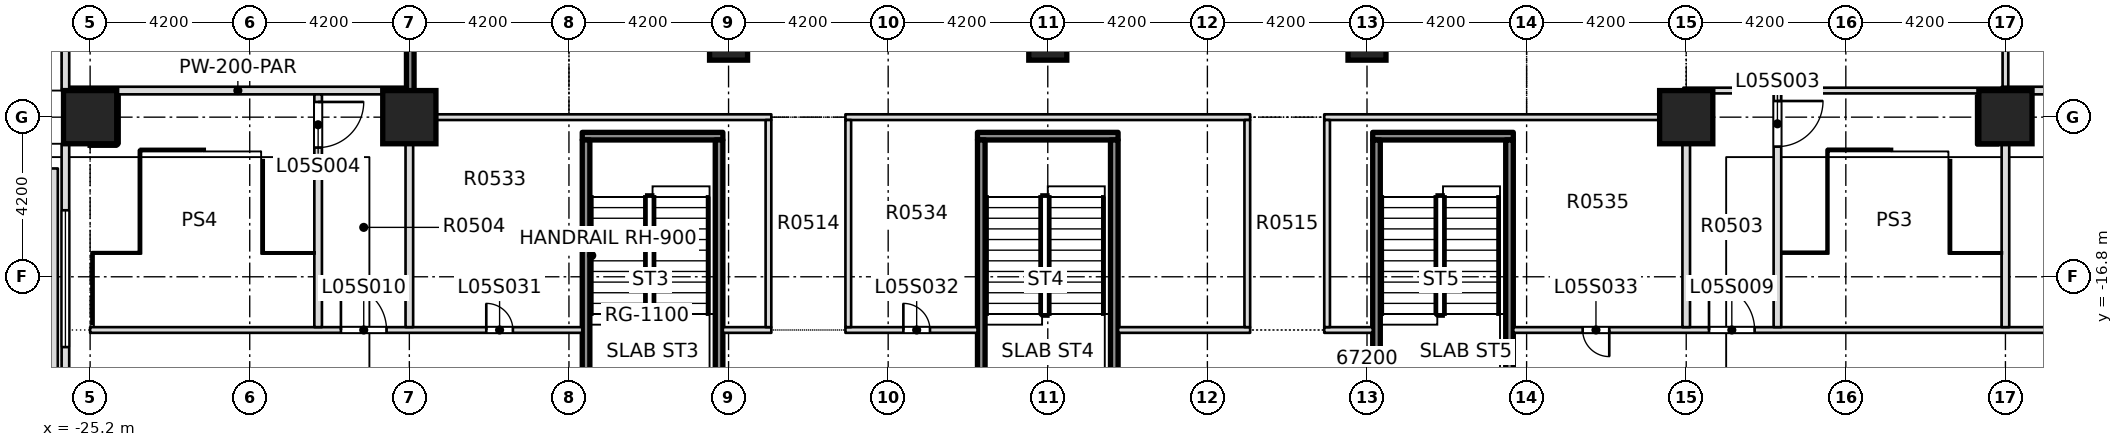
"""IFC4 building model, lengths in metres.
Left out: names, types, materials, properties, quantities, classifications, styles, units other than length and angle.
Written with IfcOpenShell. Run it as: python <this file> out.ifc"""

import sys

from ifc_helpers import new_model, si_unit, direction, frame, frame_2d, origin, origin_2d, place, context, subcontext, project, spatial, rectangle, extrude, element, fill, save


model = new_model("IFC4")
c1 = context("Model", 3, precision=1e-05, world=origin(), true_north=direction((0.0, 1.0)))
c2 = subcontext(c1, "Body", "Model", "MODEL_VIEW")
j1 = project(units=[si_unit("LENGTHUNIT", "METRE"), si_unit("PLANEANGLEUNIT", "RADIAN")], contexts=[c1])
p1 = place(None, origin())
s1 = spatial("IfcSite", under=j1, at=p1, CompositionType="ELEMENT")
p2 = place(p1, origin())
s2 = spatial("IfcBuilding", under=s1, at=p2, CompositionType="ELEMENT")
p3 = place(p2, frame((0.0, 0.0, 30.0)))
s3 = spatial("IfcBuildingStorey", under=s2, at=p3, CompositionType="ELEMENT", Elevation=30.0)
for number, where, z_axis, x_axis in (
    (1, (-25.2, -12.6, -0.4), (0.0, 0.0, 1.0), (1.0, 0.0, 0.0)),
    (2, (-16.8, -12.6, -0.4), (0.0, 0.0, 1.0), (1.0, 0.0, 0.0)),
    (3, (16.8, -12.6, -0.4), (0.0, 0.0, 1.0), (1.0, 0.0, 0.0)),
    (4, (25.2, -12.6, -0.4), (0.0, 0.0, 1.0), (1.0, 0.0, 0.0)),
):
    element("IfcColumn", number, at=place(p3, frame(where, z_axis=z_axis, x_axis=x_axis)), inside=s3, PredefinedType="COLUMN", context=c2, shape_type="SweptSolid", body=[
        extrude(rectangle(XDim=1.4, YDim=1.4, at=origin_2d()), origin(), (0.0, 0.0, 1.0), 4.58),
    ])
for number, where, z_axis, x_axis in (
    (5, (-8.4, -10.6, -0.4), (0.0, 0.0, 1.0), (1.0, 0.0, 0.0)),
    (6, (0.0, -10.6, -0.4), (0.0, 0.0, 1.0), (1.0, 0.0, 0.0)),
    (7, (8.4, -10.6, -0.4), (0.0, 0.0, 1.0), (1.0, 0.0, 0.0)),
):
    element("IfcColumn", number, at=place(p3, frame(where, z_axis=z_axis, x_axis=x_axis)), inside=s3, PredefinedType="COLUMN", context=c2, shape_type="SweptSolid", body=[
        extrude(rectangle(XDim=1.0, YDim=1.0, at=origin_2d()), origin(), (0.0, 0.0, 1.0), 4.58),
    ])
p4 = place(p3, frame((-26.15, -21.85, 4.5), z_axis=(0.0, 0.0, 1.0), x_axis=(0.0, 1.0, 0.0)))
e8 = element("IfcWall", 8, at=p4, inside=s3, PredefinedType="PARAPET", context=c2, shape_type="SweptSolid", body=[
    extrude(rectangle(XDim=7.9, YDim=0.2, at=frame_2d((3.95, 0.0))), origin(), (0.0, 0.0, 1.0), 1.2),
])
p5 = place(p3, frame((-25.2, -18.2, 0.0), z_axis=(0.0, 0.0, 1.0), x_axis=(1.0, 0.0, 0.0)))
e9 = element("IfcWall", 9, at=p5, inside=s3, PredefinedType="PARTITIONING", context=c2, shape_type="SweptSolid", body=[
    extrude(rectangle(XDim=12.95, YDim=0.15, at=frame_2d((6.475, 0.0))), origin(), (0.0, 0.0, 1.0), 4.18),
])
p6 = place(p5, frame((6.6, 0.0, 0.0)))
e10 = element("IfcOpeningElement", 10, at=p6, cuts=e9, PredefinedType="OPENING", context=c2, shape_type="SweptSolid", body=[
    extrude(rectangle(XDim=1.2, YDim=2.1, at=frame_2d((0.6, 1.05))), frame((0.0, 0.085, 0.0), z_axis=(0.0, -1.0, 0.0), x_axis=(1.0, 0.0, 0.0)), (0.0, 0.0, 1.0), 0.17),
])
p7 = place(p5, frame((10.425, 0.0, 0.0)))
e11 = element("IfcOpeningElement", 11, at=p7, cuts=e9, PredefinedType="OPENING", context=c2, shape_type="SweptSolid", body=[
    extrude(rectangle(XDim=0.7, YDim=2.1, at=frame_2d((0.35, 1.05))), frame((0.0, 0.085, 0.0), z_axis=(0.0, -1.0, 0.0), x_axis=(1.0, 0.0, 0.0)), (0.0, 0.0, 1.0), 0.17),
])
p8 = place(p3, frame((-8.55, -18.2, 0.0), z_axis=(0.0, 0.0, 1.0), x_axis=(1.0, 0.0, 0.0)))
e12 = element("IfcWall", 12, at=p8, inside=s3, PredefinedType="PARTITIONING", context=c2, shape_type="SweptSolid", body=[
    extrude(rectangle(XDim=1.275, YDim=0.15, at=frame_2d((0.638, 0.0))), origin(), (0.0, 0.0, 1.0), 4.18),
])
p9 = place(p3, frame((-5.325, -18.2, 0.0), z_axis=(0.0, 0.0, 1.0), x_axis=(1.0, 0.0, 0.0)))
e13 = element("IfcWall", 13, at=p9, inside=s3, PredefinedType="PARTITIONING", context=c2, shape_type="SweptSolid", body=[
    extrude(rectangle(XDim=3.475, YDim=0.15, at=frame_2d((1.737, 0.0))), origin(), (0.0, 0.0, 1.0), 4.18),
])
p10 = place(p9, frame((1.525, 0.0, 0.0)))
e14 = element("IfcOpeningElement", 14, at=p10, cuts=e13, PredefinedType="OPENING", context=c2, shape_type="SweptSolid", body=[
    extrude(rectangle(XDim=0.7, YDim=2.1, at=frame_2d((0.35, 1.05))), frame((0.0, 0.085, 0.0), z_axis=(0.0, -1.0, 0.0), x_axis=(1.0, 0.0, 0.0)), (0.0, 0.0, 1.0), 0.17),
])
p11 = place(p3, frame((1.85, -18.2, 0.0), z_axis=(0.0, 0.0, 1.0), x_axis=(1.0, 0.0, 0.0)))
e15 = element("IfcWall", 15, at=p11, inside=s3, PredefinedType="PARTITIONING", context=c2, shape_type="SweptSolid", body=[
    extrude(rectangle(XDim=3.475, YDim=0.15, at=frame_2d((1.737, 0.0))), origin(), (0.0, 0.0, 1.0), 4.18),
])
p12 = place(p3, frame((7.275, -18.2, 0.0), z_axis=(0.0, 0.0, 1.0), x_axis=(1.0, 0.0, 0.0)))
e16 = element("IfcWall", 16, at=p12, inside=s3, PredefinedType="PARTITIONING", context=c2, shape_type="SweptSolid", body=[
    extrude(rectangle(XDim=1.275, YDim=0.15, at=frame_2d((0.638, 0.0))), origin(), (0.0, 0.0, 1.0), 4.18),
])
p13 = place(p3, frame((12.25, -18.2, 0.0), z_axis=(0.0, 0.0, 1.0), x_axis=(1.0, 0.0, 0.0)))
e17 = element("IfcWall", 17, at=p13, inside=s3, PredefinedType="PARTITIONING", context=c2, shape_type="SweptSolid", body=[
    extrude(rectangle(XDim=24.0, YDim=0.15, at=frame_2d((12.0, 0.0))), origin(), (0.0, 0.0, 1.0), 4.18),
])
p14 = place(p13, frame((5.15, 0.0, 0.0)))
e18 = element("IfcOpeningElement", 18, at=p14, cuts=e17, PredefinedType="OPENING", context=c2, shape_type="SweptSolid", body=[
    extrude(rectangle(XDim=1.2, YDim=2.1, at=frame_2d((0.6, 1.05))), frame((0.0, 0.085, 0.0), z_axis=(0.0, -1.0, 0.0), x_axis=(1.0, 0.0, 0.0)), (0.0, 0.0, 1.0), 0.17),
])
p15 = place(p13, frame((17.975, 0.0, 0.0)))
e19 = element("IfcOpeningElement", 19, at=p15, cuts=e17, PredefinedType="OPENING", context=c2, shape_type="SweptSolid", body=[
    extrude(rectangle(XDim=0.9, YDim=2.1, at=frame_2d((0.45, 1.05))), frame((0.0, 0.085, 0.0), z_axis=(0.0, -1.0, 0.0), x_axis=(1.0, 0.0, 0.0)), (0.0, 0.0, 1.0), 0.17),
])
p16 = place(p13, frame((1.825, 0.0, 0.0)))
e20 = element("IfcOpeningElement", 20, at=p16, cuts=e17, PredefinedType="OPENING", context=c2, shape_type="SweptSolid", body=[
    extrude(rectangle(XDim=0.7, YDim=2.1, at=frame_2d((0.35, 1.05))), frame((0.0, 0.085, 0.0), z_axis=(0.0, -1.0, 0.0), x_axis=(1.0, 0.0, 0.0)), (0.0, 0.0, 1.0), 0.17),
])
p17 = place(p3, frame((-16.9, -12.6, 0.0), z_axis=(0.0, 0.0, 1.0), x_axis=(1.0, 0.0, 0.0)))
e21 = element("IfcWall", 21, at=p17, inside=s3, PredefinedType="PARTITIONING", context=c2, shape_type="SweptSolid", body=[
    extrude(rectangle(XDim=9.625, YDim=0.15, at=frame_2d((4.812, 0.0))), origin(), (0.0, 0.0, 1.0), 4.18),
])
p18 = place(p3, frame((-5.325, -12.6, 0.0), z_axis=(0.0, 0.0, 1.0), x_axis=(1.0, 0.0, 0.0)))
e22 = element("IfcWall", 22, at=p18, inside=s3, PredefinedType="PARTITIONING", context=c2, shape_type="SweptSolid", body=[
    extrude(rectangle(XDim=10.65, YDim=0.15, at=frame_2d((5.325, 0.0))), origin(), (0.0, 0.0, 1.0), 4.18),
])
p19 = place(p3, frame((7.275, -12.6, 0.0), z_axis=(0.0, 0.0, 1.0), x_axis=(1.0, 0.0, 0.0)))
e23 = element("IfcWall", 23, at=p19, inside=s3, PredefinedType="PARTITIONING", context=c2, shape_type="SweptSolid", body=[
    extrude(rectangle(XDim=9.625, YDim=0.15, at=frame_2d((4.812, 0.0))), origin(), (0.0, 0.0, 1.0), 4.18),
])
p20 = place(p3, frame((-25.75, -11.9, 0.0), z_axis=(0.0, 0.0, 1.0), x_axis=(1.0, 0.0, 0.0)))
e24 = element("IfcWall", 24, at=p20, inside=s3, PredefinedType="PARTITIONING", context=c2, shape_type="SweptSolid", body=[
    extrude(rectangle(XDim=8.875, YDim=0.2, at=frame_2d((4.438, 0.0))), origin(), (0.0, 0.0, 1.0), 4.18),
])
p21 = place(p3, frame((16.725, -11.9, 0.0), z_axis=(0.0, 0.0, 1.0), x_axis=(1.0, 0.0, 0.0)))
e25 = element("IfcWall", 25, at=p21, inside=s3, PredefinedType="PARTITIONING", context=c2, shape_type="SweptSolid", body=[
    extrude(rectangle(XDim=8.575, YDim=0.15, at=frame_2d((4.288, 0.0))), origin(), (0.0, 0.0, 1.0), 4.18),
])
p22 = place(p3, frame((25.1, -11.9, 0.0), z_axis=(0.0, 0.0, 1.0), x_axis=(1.0, 0.0, 0.0)))
e26 = element("IfcWall", 26, at=p22, inside=s3, PredefinedType="PARTITIONING", context=c2, shape_type="SweptSolid", body=[
    extrude(rectangle(XDim=17.45, YDim=0.2, at=frame_2d((8.725, 0.0))), origin(), (0.0, 0.0, 1.0), 4.18),
])
p23 = place(p22, frame((5.125, 0.0, 0.0)))
e27 = element("IfcOpeningElement", 27, at=p23, cuts=e26, PredefinedType="OPENING", context=c2, shape_type="SweptSolid", body=[
    extrude(rectangle(XDim=0.9, YDim=2.1, at=frame_2d((0.45, 1.05))), frame((0.0, 0.11, 0.0), z_axis=(0.0, -1.0, 0.0), x_axis=(1.0, 0.0, 0.0)), (0.0, 0.0, 1.0), 0.22),
])
p24 = place(p3, frame((-19.2, -18.125, 0.0), z_axis=(0.0, 0.0, 1.0), x_axis=(0.0, 1.0, 0.0)))
e28 = element("IfcWall", 28, at=p24, inside=s3, PredefinedType="PARTITIONING", context=c2, shape_type="SweptSolid", body=[
    extrude(rectangle(XDim=6.125, YDim=0.2, at=frame_2d((3.062, 0.0))), origin(), (0.0, 0.0, 1.0), 4.18),
])
p25 = place(p24, frame((4.725, 0.0, 0.0)))
e29 = element("IfcOpeningElement", 29, at=p25, cuts=e28, PredefinedType="OPENING", context=c2, shape_type="SweptSolid", body=[
    extrude(rectangle(XDim=1.2, YDim=2.1, at=frame_2d((0.6, 1.05))), frame((0.0, 0.11, 0.0), z_axis=(0.0, -1.0, 0.0), x_axis=(1.0, 0.0, 0.0)), (0.0, 0.0, 1.0), 0.22),
])
p26 = place(p3, frame((-16.8, -18.125, 0.0), z_axis=(0.0, 0.0, 1.0), x_axis=(0.0, 1.0, 0.0)))
e30 = element("IfcWall", 30, at=p26, inside=s3, PredefinedType="PARTITIONING", context=c2, shape_type="SweptSolid", body=[
    extrude(rectangle(XDim=5.45, YDim=0.2, at=frame_2d((2.725, 0.0))), origin(), (0.0, 0.0, 1.0), 4.18),
])
for number, where, z_axis, x_axis in (
    (31, (-7.35, -18.125, 0.0), (0.0, 0.0, 1.0), (0.0, 1.0, 0.0)),
    (32, (-5.25, -18.125, 0.0), (0.0, 0.0, 1.0), (0.0, 1.0, 0.0)),
    (33, (5.25, -18.125, 0.0), (0.0, 0.0, 1.0), (0.0, 1.0, 0.0)),
    (34, (7.35, -18.125, 0.0), (0.0, 0.0, 1.0), (0.0, 1.0, 0.0)),
):
    element("IfcWall", number, at=place(p3, frame(where, z_axis=z_axis, x_axis=x_axis)), inside=s3, PredefinedType="PARTITIONING", context=c2, shape_type="SweptSolid", body=[
        extrude(rectangle(XDim=5.45, YDim=0.15, at=frame_2d((2.725, 0.0))), origin(), (0.0, 0.0, 1.0), 4.18),
    ])
p27 = place(p3, frame((16.8, -18.125, 0.0), z_axis=(0.0, 0.0, 1.0), x_axis=(0.0, 1.0, 0.0)))
e35 = element("IfcWall", 35, at=p27, inside=s3, PredefinedType="PARTITIONING", context=c2, shape_type="SweptSolid", body=[
    extrude(rectangle(XDim=5.45, YDim=0.2, at=frame_2d((2.725, 0.0))), origin(), (0.0, 0.0, 1.0), 4.18),
])
p28 = place(p3, frame((16.8, -12.525, 0.0), z_axis=(0.0, 0.0, 1.0), x_axis=(0.0, 1.0, 0.0)))
e36 = element("IfcWall", 36, at=p28, inside=s3, PredefinedType="PARTITIONING", context=c2, shape_type="SweptSolid", body=[
    extrude(rectangle(XDim=0.55, YDim=0.15, at=frame_2d((0.275, 0.0))), origin(), (0.0, 0.0, 1.0), 4.18),
])
p29 = place(p3, frame((19.2, -18.125, 0.0), z_axis=(0.0, 0.0, 1.0), x_axis=(0.0, 1.0, 0.0)))
e37 = element("IfcWall", 37, at=p29, inside=s3, PredefinedType="PARTITIONING", context=c2, shape_type="SweptSolid", body=[
    extrude(rectangle(XDim=6.15, YDim=0.2, at=frame_2d((3.075, 0.0))), origin(), (0.0, 0.0, 1.0), 4.18),
])
p30 = place(p29, frame((4.75, 0.0, 0.0)))
e38 = element("IfcOpeningElement", 38, at=p30, cuts=e37, PredefinedType="OPENING", context=c2, shape_type="SweptSolid", body=[
    extrude(rectangle(XDim=1.2, YDim=2.1, at=frame_2d((0.6, 1.05))), frame((0.0, 0.11, 0.0), z_axis=(0.0, -1.0, 0.0), x_axis=(1.0, 0.0, 0.0)), (0.0, 0.0, 1.0), 0.22),
])
p31 = place(p3, frame((25.2, -18.125, 0.0), z_axis=(0.0, 0.0, 1.0), x_axis=(0.0, 1.0, 0.0)))
e39 = element("IfcWall", 39, at=p31, inside=s3, PredefinedType="PARTITIONING", context=c2, shape_type="SweptSolid", body=[
    extrude(rectangle(XDim=6.125, YDim=0.2, at=frame_2d((3.062, 0.0))), origin(), (0.0, 0.0, 1.0), 4.18),
])
p32 = place(p3, frame((25.2, -11.8, 0.0), z_axis=(0.0, 0.0, 1.0), x_axis=(0.0, 1.0, 0.0)))
e40 = element("IfcWall", 40, at=p32, inside=s3, PredefinedType="PARTITIONING", context=c2, shape_type="SweptSolid", body=[
    extrude(rectangle(XDim=24.3, YDim=0.15, at=frame_2d((12.15, 0.0))), origin(), (0.0, 0.0, 1.0), 4.18),
])
p33 = place(p32, frame((11.25, 0.0, 0.0)))
e41 = element("IfcOpeningElement", 41, at=p33, cuts=e40, PredefinedType="OPENING", context=c2, shape_type="SweptSolid", body=[
    extrude(rectangle(XDim=1.8, YDim=2.1, at=frame_2d((0.9, 1.05))), frame((0.0, 0.085, 0.0), z_axis=(0.0, -1.0, 0.0), x_axis=(1.0, 0.0, 0.0)), (0.0, 0.0, 1.0), 0.17),
])
p34 = place(p3, frame((-25.85, -4.9, 0.0), z_axis=(0.0, 0.0, 1.0), x_axis=(0.0, -1.0, 0.0)))
e42 = element("IfcWall", 42, at=p34, inside=s3, PredefinedType="STANDARD", context=c2, shape_type="SweptSolid", body=[
    extrude(rectangle(XDim=7.0, YDim=0.2, at=frame_2d((3.5, 0.0))), origin(), (0.0, 0.0, 1.0), 4.18),
])
p35 = place(p34, frame((1.7, 0.0, 0.9)))
e43 = element("IfcOpeningElement", 43, at=p35, cuts=e42, PredefinedType="OPENING", context=c2, shape_type="SweptSolid", body=[
    extrude(rectangle(XDim=3.6, YDim=2.4, at=frame_2d((1.8, 1.2))), frame((0.0, 0.11, 0.0), z_axis=(0.0, -1.0, 0.0), x_axis=(1.0, 0.0, 0.0)), (0.0, 0.0, 1.0), 0.22),
])
p36 = place(p3, frame((-25.85, -13.3, 0.0), z_axis=(0.0, 0.0, 1.0), x_axis=(0.0, -1.0, 0.0)))
e44 = element("IfcWall", 44, at=p36, inside=s3, PredefinedType="STANDARD", context=c2, shape_type="SweptSolid", body=[
    extrude(rectangle(XDim=7.1, YDim=0.2, at=frame_2d((3.55, 0.0))), origin(), (0.0, 0.0, 1.0), 4.18),
])
p37 = place(p36, frame((1.75, 0.0, 0.9)))
e45 = element("IfcOpeningElement", 45, at=p37, cuts=e44, PredefinedType="OPENING", context=c2, shape_type="SweptSolid", body=[
    extrude(rectangle(XDim=3.6, YDim=2.4, at=frame_2d((1.8, 1.2))), frame((0.0, 0.11, 0.0), z_axis=(0.0, -1.0, 0.0), x_axis=(1.0, 0.0, 0.0)), (0.0, 0.0, 1.0), 0.22),
])
p38 = place(p3, frame((-12.25, -13.1, 0.0), z_axis=(0.0, 0.0, 1.0), x_axis=(1.0, 0.0, 0.0)))
e46 = element("IfcWall", 46, at=p38, inside=s3, PredefinedType="SOLIDWALL", context=c2, shape_type="SweptSolid", body=[
    extrude(rectangle(XDim=3.7, YDim=0.2, at=frame_2d((1.85, 0.0))), origin(), (0.0, 0.0, 1.0), 4.18),
])
p39 = place(p3, frame((-12.15, -19.8, 0.0), z_axis=(0.0, 0.0, 1.0), x_axis=(0.0, 1.0, 0.0)))
e47 = element("IfcWall", 47, at=p39, inside=s3, PredefinedType="SOLIDWALL", context=c2, shape_type="SweptSolid", body=[
    extrude(rectangle(XDim=6.6, YDim=0.2, at=frame_2d((3.3, 0.0))), origin(), (0.0, 0.0, 1.0), 4.18),
])
p40 = place(p3, frame((-8.65, -20.3, 0.0), z_axis=(0.0, 0.0, 1.0), x_axis=(0.0, 1.0, 0.0)))
e48 = element("IfcWall", 48, at=p40, inside=s3, PredefinedType="SOLIDWALL", context=c2, shape_type="SweptSolid", body=[
    extrude(rectangle(XDim=7.1, YDim=0.2, at=frame_2d((3.55, 0.0))), origin(), (0.0, 0.0, 1.0), 4.18),
])
p41 = place(p3, frame((-1.85, -13.1, 0.0), z_axis=(0.0, 0.0, 1.0), x_axis=(1.0, 0.0, 0.0)))
e49 = element("IfcWall", 49, at=p41, inside=s3, PredefinedType="SOLIDWALL", context=c2, shape_type="SweptSolid", body=[
    extrude(rectangle(XDim=3.7, YDim=0.2, at=frame_2d((1.85, 0.0))), origin(), (0.0, 0.0, 1.0), 4.18),
])
for number, where, z_axis, x_axis in (
    (50, (-1.75, -19.8, 0.0), (0.0, 0.0, 1.0), (0.0, 1.0, 0.0)),
    (51, (1.75, -19.8, 0.0), (0.0, 0.0, 1.0), (0.0, 1.0, 0.0)),
):
    element("IfcWall", number, at=place(p3, frame(where, z_axis=z_axis, x_axis=x_axis)), inside=s3, PredefinedType="SOLIDWALL", context=c2, shape_type="SweptSolid", body=[
        extrude(rectangle(XDim=6.6, YDim=0.2, at=frame_2d((3.3, 0.0))), origin(), (0.0, 0.0, 1.0), 4.18),
    ])
p42 = place(p3, frame((8.55, -13.1, 0.0), z_axis=(0.0, 0.0, 1.0), x_axis=(1.0, 0.0, 0.0)))
e52 = element("IfcWall", 52, at=p42, inside=s3, PredefinedType="SOLIDWALL", context=c2, shape_type="SweptSolid", body=[
    extrude(rectangle(XDim=3.7, YDim=0.2, at=frame_2d((1.85, 0.0))), origin(), (0.0, 0.0, 1.0), 4.18),
])
p43 = place(p3, frame((8.65, -20.3, 0.0), z_axis=(0.0, 0.0, 1.0), x_axis=(0.0, 1.0, 0.0)))
e53 = element("IfcWall", 53, at=p43, inside=s3, PredefinedType="SOLIDWALL", context=c2, shape_type="SweptSolid", body=[
    extrude(rectangle(XDim=7.1, YDim=0.2, at=frame_2d((3.55, 0.0))), origin(), (0.0, 0.0, 1.0), 4.18),
])
p44 = place(p3, frame((12.15, -19.8, 0.0), z_axis=(0.0, 0.0, 1.0), x_axis=(0.0, 1.0, 0.0)))
e54 = element("IfcWall", 54, at=p44, inside=s3, PredefinedType="SOLIDWALL", context=c2, shape_type="SweptSolid", body=[
    extrude(rectangle(XDim=6.6, YDim=0.2, at=frame_2d((3.3, 0.0))), origin(), (0.0, 0.0, 1.0), 4.18),
])
p45 = place(p3, frame((-16.775, -12.525, 0.0), z_axis=(0.0, 0.0, 1.0), x_axis=(-0.000714569091, 0.999999744695, 0.0)))
e55 = element("IfcWall", 55, at=p45, inside=s3, PredefinedType="SOLIDWALL", context=c2, shape_type="SweptSolid", body=[
    extrude(rectangle(XDim=9.225, YDim=0.2, at=frame_2d((4.612, 0.0))), origin(), (0.0, 0.0, 1.0), 4.18),
])
p46 = place(p30, origin())
e56 = element("IfcDoor", 56, at=p46, inside=s3, OperationType="DOUBLE_DOOR_SINGLE_SWING", PredefinedType="DOOR", context=c2, shape_type="SweptSolid", body=[
    extrude(rectangle(XDim=1.2, YDim=2.1, at=frame_2d((0.6, 1.05))), frame((0.0, 0.025, 0.0), z_axis=(0.0, -1.0, 0.0), x_axis=(1.0, 0.0, 0.0)), (0.0, 0.0, 1.0), 0.05),
])
fill(e38, e56)
p47 = place(p25, origin())
e57 = element("IfcDoor", 57, at=p47, inside=s3, OperationType="DOUBLE_DOOR_SINGLE_SWING", PredefinedType="DOOR", context=c2, shape_type="SweptSolid", body=[
    extrude(rectangle(XDim=1.2, YDim=2.1, at=frame_2d((0.6, 1.05))), frame((0.0, 0.025, 0.0), z_axis=(0.0, -1.0, 0.0), x_axis=(1.0, 0.0, 0.0)), (0.0, 0.0, 1.0), 0.05),
])
fill(e29, e57)
p48 = place(p14, origin())
e58 = element("IfcDoor", 58, at=p48, inside=s3, OperationType="SINGLE_SWING_LEFT", PredefinedType="DOOR", context=c2, shape_type="SweptSolid", body=[
    extrude(rectangle(XDim=1.2, YDim=2.1, at=frame_2d((0.6, 1.05))), frame((0.0, 0.025, 0.0), z_axis=(0.0, -1.0, 0.0), x_axis=(1.0, 0.0, 0.0)), (0.0, 0.0, 1.0), 0.05),
])
fill(e18, e58)
p49 = place(p6, origin())
e59 = element("IfcDoor", 59, at=p49, inside=s3, OperationType="SINGLE_SWING_RIGHT", PredefinedType="DOOR", context=c2, shape_type="SweptSolid", body=[
    extrude(rectangle(XDim=1.2, YDim=2.1, at=frame_2d((0.6, 1.05))), frame((0.0, 0.025, 0.0), z_axis=(0.0, -1.0, 0.0), x_axis=(1.0, 0.0, 0.0)), (0.0, 0.0, 1.0), 0.05),
])
fill(e10, e59)
p50 = place(p7, origin())
e60 = element("IfcDoor", 60, at=p50, inside=s3, OperationType="SINGLE_SWING_RIGHT", PredefinedType="DOOR", context=c2, shape_type="SweptSolid", body=[
    extrude(rectangle(XDim=0.7, YDim=2.1, at=frame_2d((0.35, 1.05))), frame((0.0, 0.025, 0.0), z_axis=(0.0, -1.0, 0.0), x_axis=(1.0, 0.0, 0.0)), (0.0, 0.0, 1.0), 0.05),
])
fill(e11, e60)
p51 = place(p10, origin())
e61 = element("IfcDoor", 61, at=p51, inside=s3, OperationType="SINGLE_SWING_LEFT", PredefinedType="DOOR", context=c2, shape_type="SweptSolid", body=[
    extrude(rectangle(XDim=0.7, YDim=2.1, at=frame_2d((0.35, 1.05))), frame((0.0, 0.025, 0.0), z_axis=(0.0, -1.0, 0.0), x_axis=(1.0, 0.0, 0.0)), (0.0, 0.0, 1.0), 0.05),
])
fill(e14, e61)
p52 = place(p16, origin())
e62 = element("IfcDoor", 62, at=p52, inside=s3, OperationType="SINGLE_SWING_LEFT", PredefinedType="DOOR", context=c2, shape_type="SweptSolid", body=[
    extrude(rectangle(XDim=0.7, YDim=2.1, at=frame_2d((0.35, 1.05))), frame((0.0, 0.025, 0.0), z_axis=(0.0, -1.0, 0.0), x_axis=(1.0, 0.0, 0.0)), (0.0, 0.0, 1.0), 0.05),
])
fill(e20, e62)
p53 = place(p37, origin())
e63 = element("IfcWindow", 63, at=p53, inside=s3, PartitioningType="SINGLE_PANEL", PredefinedType="WINDOW", context=c2, shape_type="SweptSolid", body=[
    extrude(rectangle(XDim=3.6, YDim=2.4, at=frame_2d((1.8, 1.2))), frame((0.0, 0.03, 0.0), z_axis=(0.0, -1.0, 0.0), x_axis=(1.0, 0.0, 0.0)), (0.0, 0.0, 1.0), 0.06),
])
fill(e45, e63)
save(model, sys.argv[1])
